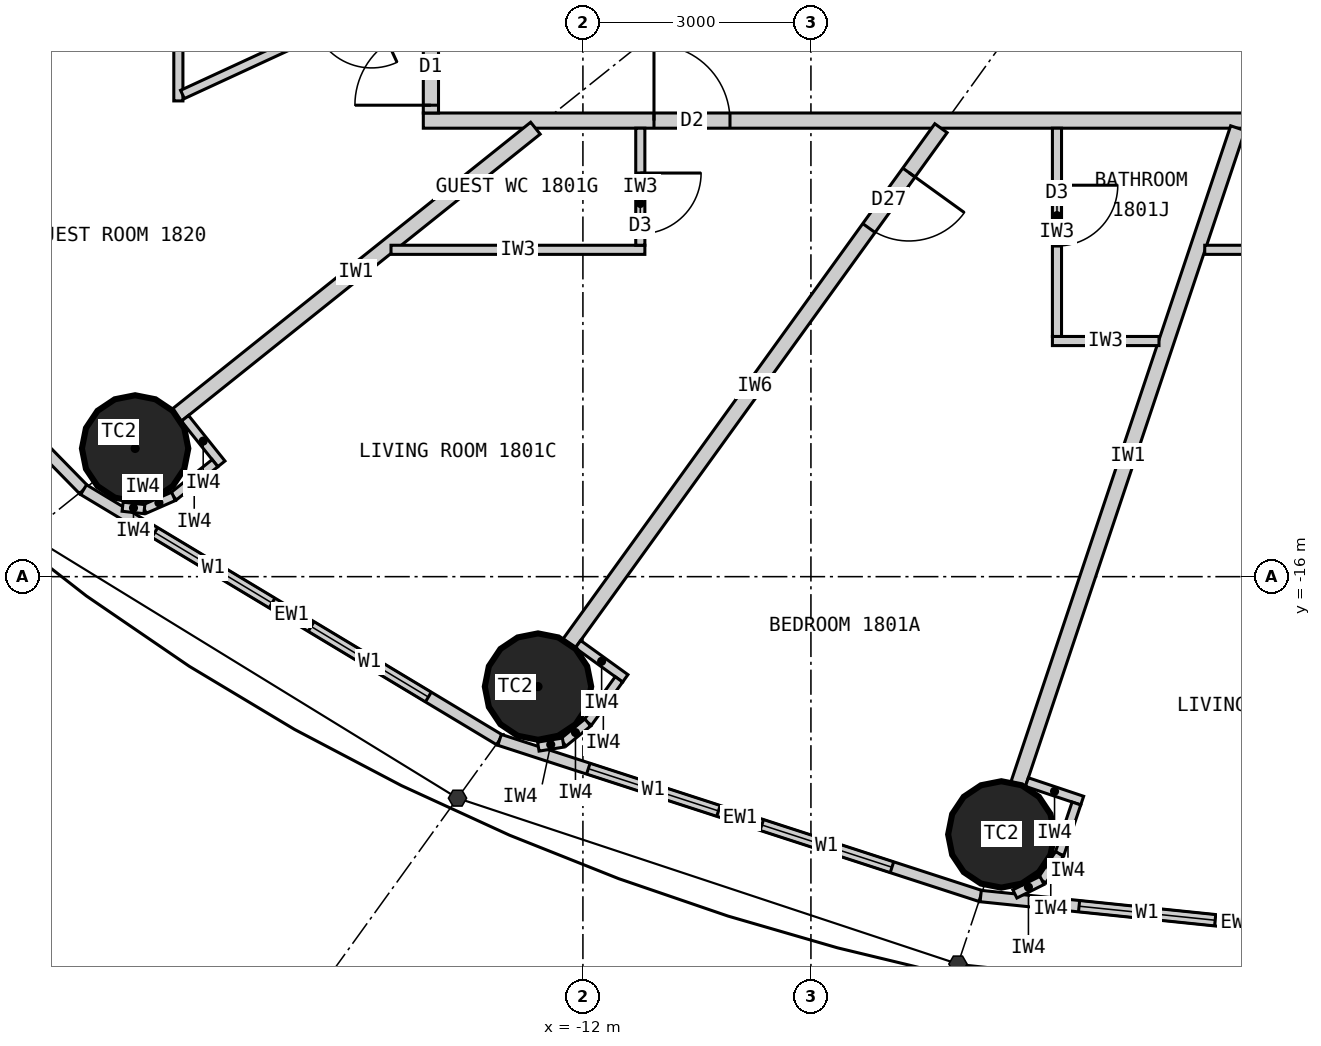
"""IFC4 building model, lengths in metres.
Left out: names, types, materials, properties, quantities, classifications, styles, units other than length and angle.
Written with IfcOpenShell. Run it as: python <this file> out.ifc"""

import sys

from ifc_helpers import new_model, si_unit, direction, frame, frame_2d, origin, origin_2d, place, context, subcontext, project, spatial, rectangle, circle, extrude, element, fill, save


model = new_model("IFC4")
c1 = context("Model", 3, precision=1e-05, world=origin(), true_north=direction((0.0, 1.0)))
c2 = subcontext(c1, "Body", "Model", "MODEL_VIEW")
j1 = project(units=[si_unit("LENGTHUNIT", "METRE"), si_unit("PLANEANGLEUNIT", "RADIAN")], contexts=[c1])
p1 = place(None, origin())
s1 = spatial("IfcSite", under=j1, at=p1, CompositionType="ELEMENT")
p2 = place(p1, origin())
s2 = spatial("IfcBuilding", under=s1, at=p2, CompositionType="ELEMENT")
p3 = place(p2, frame((0.0, 0.0, 73.8)))
s3 = spatial("IfcBuildingStorey", under=s2, at=p3, CompositionType="ELEMENT", Elevation=73.8)
for number, where, z_axis, x_axis in (
    (1, (-17.892, -14.313, 0.0), (0.0, 0.0, 1.0), (1.0, 0.0, 0.0)),
    (2, (-12.591, -17.447, 0.0), (0.0, 0.0, 1.0), (1.0, 0.0, 0.0)),
    (3, (-6.495, -19.391, 0.0), (0.0, 0.0, 1.0), (1.0, 0.0, 0.0)),
):
    element("IfcColumn", number, at=place(p3, frame(where, z_axis=z_axis, x_axis=x_axis)), inside=s3, PredefinedType="COLUMN", context=c2, shape_type="SweptSolid", body=[
        extrude(circle(Radius=0.7, at=origin_2d()), origin(), (0.0, 0.0, 1.0), 3.3),
    ])
p4 = place(p3, frame((-22.803, -10.532, 0.0), z_axis=(0.0, 0.0, 1.0), x_axis=(0.699602905915, -0.714531856557, 0.0)))
e4 = element("IfcWall", 4, at=p4, inside=s3, PredefinedType="ELEMENTEDWALL", context=c2, shape_type="SweptSolid", body=[
    extrude(rectangle(XDim=6.051, YDim=0.15, at=frame_2d((3.025, 0.0))), origin(), (0.0, 0.0, 1.0), 3.12),
])
p5 = place(p4, frame((0.926, 0.0, 0.9)))
e5 = element("IfcOpeningElement", 5, at=p5, cuts=e4, PredefinedType="OPENING", context=c2, shape_type="SweptSolid", body=[
    extrude(rectangle(XDim=1.8, YDim=1.9, at=frame_2d((0.9, 0.95))), frame((0.0, 0.085, 0.0), z_axis=(0.0, -1.0, 0.0), x_axis=(1.0, 0.0, 0.0)), (0.0, 0.0, 1.0), 0.17),
])
p6 = place(p4, frame((3.325, 0.0, 0.9)))
e6 = element("IfcOpeningElement", 6, at=p6, cuts=e4, PredefinedType="OPENING", context=c2, shape_type="SweptSolid", body=[
    extrude(rectangle(XDim=1.8, YDim=1.9, at=frame_2d((0.9, 0.95))), frame((0.0, 0.085, 0.0), z_axis=(0.0, -1.0, 0.0), x_axis=(1.0, 0.0, 0.0)), (0.0, 0.0, 1.0), 0.17),
])
p7 = place(p3, frame((-18.57, -14.856, 0.0), z_axis=(0.0, 0.0, 1.0), x_axis=(0.856983180864, -0.515344377787, 0.0)))
e7 = element("IfcWall", 7, at=p7, inside=s3, PredefinedType="ELEMENTEDWALL", context=c2, shape_type="SweptSolid", body=[
    extrude(rectangle(XDim=6.386, YDim=0.15, at=frame_2d((3.193, 0.0))), origin(), (0.0, 0.0, 1.0), 3.12),
])
p8 = place(p7, frame((1.093, 0.0, 0.9)))
e8 = element("IfcOpeningElement", 8, at=p8, cuts=e7, PredefinedType="OPENING", context=c2, shape_type="SweptSolid", body=[
    extrude(rectangle(XDim=1.8, YDim=1.9, at=frame_2d((0.9, 0.95))), frame((0.0, 0.085, 0.0), z_axis=(0.0, -1.0, 0.0), x_axis=(1.0, 0.0, 0.0)), (0.0, 0.0, 1.0), 0.17),
])
p9 = place(p7, frame((3.493, 0.0, 0.9)))
e9 = element("IfcOpeningElement", 9, at=p9, cuts=e7, PredefinedType="OPENING", context=c2, shape_type="SweptSolid", body=[
    extrude(rectangle(XDim=1.8, YDim=1.9, at=frame_2d((0.9, 0.95))), frame((0.0, 0.085, 0.0), z_axis=(0.0, -1.0, 0.0), x_axis=(1.0, 0.0, 0.0)), (0.0, 0.0, 1.0), 0.17),
])
p10 = place(p3, frame((-13.096, -18.147, 0.0), z_axis=(0.0, 0.0, 1.0), x_axis=(0.951137534625, -0.308767534285, 0.0)))
e10 = element("IfcWall", 10, at=p10, inside=s3, PredefinedType="ELEMENTEDWALL", context=c2, shape_type="SweptSolid", body=[
    extrude(rectangle(XDim=6.655, YDim=0.15, at=frame_2d((3.328, 0.0))), origin(), (0.0, 0.0, 1.0), 3.12),
])
p11 = place(p10, frame((1.228, 0.0, 0.9)))
e11 = element("IfcOpeningElement", 11, at=p11, cuts=e10, PredefinedType="OPENING", context=c2, shape_type="SweptSolid", body=[
    extrude(rectangle(XDim=1.8, YDim=1.9, at=frame_2d((0.9, 0.95))), frame((0.0, 0.085, 0.0), z_axis=(0.0, -1.0, 0.0), x_axis=(1.0, 0.0, 0.0)), (0.0, 0.0, 1.0), 0.17),
])
p12 = place(p10, frame((3.628, 0.0, 0.9)))
e12 = element("IfcOpeningElement", 12, at=p12, cuts=e10, PredefinedType="OPENING", context=c2, shape_type="SweptSolid", body=[
    extrude(rectangle(XDim=1.8, YDim=1.9, at=frame_2d((0.9, 0.95))), frame((0.0, 0.085, 0.0), z_axis=(0.0, -1.0, 0.0), x_axis=(1.0, 0.0, 0.0)), (0.0, 0.0, 1.0), 0.17),
])
p13 = place(p3, frame((-6.766, -20.202, 0.0), z_axis=(0.0, 0.0, 1.0), x_axis=(0.994721394369, -0.102612609291, 0.0)))
e13 = element("IfcWall", 13, at=p13, inside=s3, PredefinedType="ELEMENTEDWALL", context=c2, shape_type="SweptSolid", body=[
    extrude(rectangle(XDim=6.802, YDim=0.15, at=frame_2d((3.401, 0.0))), origin(), (0.0, 0.0, 1.0), 3.12),
])
p14 = place(p13, frame((1.301, 0.0, 0.9)))
e14 = element("IfcOpeningElement", 14, at=p14, cuts=e13, PredefinedType="OPENING", context=c2, shape_type="SweptSolid", body=[
    extrude(rectangle(XDim=1.8, YDim=1.9, at=frame_2d((0.9, 0.95))), frame((0.0, 0.085, 0.0), z_axis=(0.0, -1.0, 0.0), x_axis=(1.0, 0.0, 0.0)), (0.0, 0.0, 1.0), 0.17),
])
p15 = place(p13, frame((3.701, 0.0, 0.9)))
e15 = element("IfcOpeningElement", 15, at=p15, cuts=e13, PredefinedType="OPENING", context=c2, shape_type="SweptSolid", body=[
    extrude(rectangle(XDim=1.8, YDim=1.9, at=frame_2d((0.9, 0.95))), frame((0.0, 0.085, 0.0), z_axis=(0.0, -1.0, 0.0), x_axis=(1.0, 0.0, 0.0)), (0.0, 0.0, 1.0), 0.17),
])
p16 = place(p3, frame((14.1, -10.0, 0.0), z_axis=(0.0, 0.0, 1.0), x_axis=(-1.0, 0.0, 0.0)))
e16 = element("IfcWall", 16, at=p16, inside=s3, PredefinedType="PARTITIONING", context=c2, shape_type="SweptSolid", body=[
    extrude(rectangle(XDim=28.2, YDim=0.2, at=frame_2d((14.1, 0.0))), origin(), (0.0, 0.0, 1.0), 3.12),
])
p17 = place(p16, frame((24.165, 0.0, 0.0)))
e17 = element("IfcOpeningElement", 17, at=p17, cuts=e16, PredefinedType="OPENING", context=c2, shape_type="SweptSolid", body=[
    extrude(rectangle(XDim=1.0, YDim=2.2, at=frame_2d((0.5, 1.1))), frame((0.0, 0.11, 0.0), z_axis=(0.0, -1.0, 0.0), x_axis=(1.0, 0.0, 0.0)), (0.0, 0.0, 1.0), 0.22),
])
p18 = place(p16, frame((14.923, 0.0, 0.0)))
e18 = element("IfcOpeningElement", 18, at=p18, cuts=e16, PredefinedType="OPENING", context=c2, shape_type="SweptSolid", body=[
    extrude(rectangle(XDim=1.0, YDim=2.2, at=frame_2d((0.5, 1.1))), frame((0.0, 0.11, 0.0), z_axis=(0.0, -1.0, 0.0), x_axis=(1.0, 0.0, 0.0)), (0.0, 0.0, 1.0), 0.22),
])
p19 = place(p16, frame((3.035, 0.0, 0.0)))
e19 = element("IfcOpeningElement", 19, at=p19, cuts=e16, PredefinedType="OPENING", context=c2, shape_type="SweptSolid", body=[
    extrude(rectangle(XDim=1.0, YDim=2.2, at=frame_2d((0.5, 1.1))), frame((0.0, 0.11, 0.0), z_axis=(0.0, -1.0, 0.0), x_axis=(1.0, 0.0, 0.0)), (0.0, 0.0, 1.0), 0.22),
])
p20 = place(p3, frame((-14.1, -6.512, 0.0), z_axis=(0.0, 0.0, 1.0), x_axis=(-0.907832871056, -0.419332181247, 0.0)))
e20 = element("IfcWall", 20, at=p20, inside=s3, PredefinedType="PARTITIONING", context=c2, shape_type="SweptSolid", body=[
    extrude(rectangle(XDim=8.023, YDim=0.2, at=frame_2d((4.011, 0.0))), origin(), (0.0, 0.0, 1.0), 2.32),
])
p21 = place(p3, frame((-12.625, -10.1, 0.0), z_axis=(0.0, 0.0, 1.0), x_axis=(-0.780892451574, -0.624665493744, 0.0)))
e21 = element("IfcWall", 21, at=p21, inside=s3, PredefinedType="PARTITIONING", context=c2, shape_type="SweptSolid", body=[
    extrude(rectangle(XDim=6.045, YDim=0.2, at=frame_2d((3.022, 0.0))), origin(), (0.0, 0.0, 1.0), 2.32),
])
p22 = place(p3, frame((-7.289, -10.1, 0.0), z_axis=(0.0, 0.0, 1.0), x_axis=(-0.585198353053, -0.810890182197, 0.0)))
e22 = element("IfcWall", 22, at=p22, inside=s3, PredefinedType="PARTITIONING", context=c2, shape_type="SweptSolid", body=[
    extrude(rectangle(XDim=8.36, YDim=0.2, at=frame_2d((4.18, 0.0))), origin(), (0.0, 0.0, 1.0), 2.32),
])
p23 = place(p22, frame((0.72, 0.0, 0.0)))
e23 = element("IfcOpeningElement", 23, at=p23, cuts=e22, PredefinedType="OPENING", context=c2, shape_type="SweptSolid", body=[
    extrude(rectangle(XDim=0.9, YDim=2.1, at=frame_2d((0.45, 1.05))), frame((0.0, 0.11, 0.0), z_axis=(0.0, -1.0, 0.0), x_axis=(1.0, 0.0, 0.0)), (0.0, 0.0, 1.0), 0.22),
])
p24 = place(p3, frame((-3.383, -10.1, 0.0), z_axis=(0.0, 0.0, 1.0), x_axis=(-0.31759592231, -0.948226149256, 0.0)))
e24 = element("IfcWall", 24, at=p24, inside=s3, PredefinedType="PARTITIONING", context=c2, shape_type="SweptSolid", body=[
    extrude(rectangle(XDim=9.098, YDim=0.2, at=frame_2d((4.549, 0.0))), origin(), (0.0, 0.0, 1.0), 2.32),
])
p25 = place(p3, frame((-14.525, -11.7, 0.0), z_axis=(0.0, 0.0, 1.0), x_axis=(1.0, 0.0, 0.0)))
e25 = element("IfcWall", 25, at=p25, inside=s3, PredefinedType="PARTITIONING", context=c2, shape_type="SweptSolid", body=[
    extrude(rectangle(XDim=3.34, YDim=0.12, at=frame_2d((1.67, 0.0))), origin(), (0.0, 0.0, 1.0), 3.12),
])
p26 = place(p3, frame((-11.245, -10.1, 0.0), z_axis=(0.0, 0.0, 1.0), x_axis=(0.0, -1.0, 0.0)))
e26 = element("IfcWall", 26, at=p26, inside=s3, PredefinedType="PARTITIONING", context=c2, shape_type="SweptSolid", body=[
    extrude(rectangle(XDim=1.54, YDim=0.12, at=frame_2d((0.77, 0.0))), origin(), (0.0, 0.0, 1.0), 3.12),
])
p27 = place(p26, frame((0.59, 0.0, 0.0)))
e27 = element("IfcOpeningElement", 27, at=p27, cuts=e26, PredefinedType="OPENING", context=c2, shape_type="SweptSolid", body=[
    extrude(rectangle(XDim=0.8, YDim=2.1, at=frame_2d((0.4, 1.05))), frame((0.0, 0.07, 0.0), z_axis=(0.0, -1.0, 0.0), x_axis=(1.0, 0.0, 0.0)), (0.0, 0.0, 1.0), 0.14),
])
p28 = place(p3, frame((-4.421, -12.9, 0.0), z_axis=(0.0, 0.0, 1.0), x_axis=(-1.0, 0.0, 0.0)))
e28 = element("IfcWall", 28, at=p28, inside=s3, PredefinedType="PARTITIONING", context=c2, shape_type="SweptSolid", body=[
    extrude(rectangle(XDim=1.402, YDim=0.12, at=frame_2d((0.701, 0.0))), origin(), (0.0, 0.0, 1.0), 3.12),
])
p29 = place(p3, frame((-5.763, -10.1, 0.0), z_axis=(0.0, 0.0, 1.0), x_axis=(0.0, -1.0, 0.0)))
e29 = element("IfcWall", 29, at=p29, inside=s3, PredefinedType="PARTITIONING", context=c2, shape_type="SweptSolid", body=[
    extrude(rectangle(XDim=2.74, YDim=0.12, at=frame_2d((1.37, 0.0))), origin(), (0.0, 0.0, 1.0), 3.12),
])
p30 = place(p29, frame((0.75, 0.0, 0.0)))
e30 = element("IfcOpeningElement", 30, at=p30, cuts=e29, PredefinedType="OPENING", context=c2, shape_type="SweptSolid", body=[
    extrude(rectangle(XDim=0.8, YDim=2.1, at=frame_2d((0.4, 1.05))), frame((0.0, 0.07, 0.0), z_axis=(0.0, -1.0, 0.0), x_axis=(1.0, 0.0, 0.0)), (0.0, 0.0, 1.0), 0.14),
])
p31 = place(p3, frame((-3.819, -11.7, 0.0), z_axis=(0.0, 0.0, 1.0), x_axis=(1.0, 0.0, 0.0)))
e31 = element("IfcWall", 31, at=p31, inside=s3, PredefinedType="PARTITIONING", context=c2, shape_type="SweptSolid", body=[
    extrude(rectangle(XDim=1.876, YDim=0.12, at=frame_2d((0.938, 0.0))), origin(), (0.0, 0.0, 1.0), 3.12),
])
p32 = place(p3, frame((-17.323, -8.101, 0.0), z_axis=(0.0, 0.0, 1.0), x_axis=(0.0, -1.0, 0.0)))
e32 = element("IfcWall", 32, at=p32, inside=s3, PredefinedType="PARTITIONING", context=c2, shape_type="SweptSolid", body=[
    extrude(rectangle(XDim=1.64, YDim=0.12, at=frame_2d((0.82, 0.0))), origin(), (0.0, 0.0, 1.0), 3.12),
])
p33 = place(p3, frame((-14.1, -8.193, 0.0), z_axis=(0.0, 0.0, 1.0), x_axis=(-0.907836493557, -0.419324338628, 0.0)))
e33 = element("IfcWall", 33, at=p33, inside=s3, PredefinedType="PARTITIONING", context=c2, shape_type="SweptSolid", body=[
    extrude(rectangle(XDim=3.49, YDim=0.12, at=frame_2d((1.745, 0.0))), origin(), (0.0, 0.0, 1.0), 3.12),
])
p34 = place(p33, frame((0.75, 0.0, 0.0)))
e34 = element("IfcOpeningElement", 34, at=p34, cuts=e33, PredefinedType="OPENING", context=c2, shape_type="SweptSolid", body=[
    extrude(rectangle(XDim=0.8, YDim=2.1, at=frame_2d((0.4, 1.05))), frame((0.0, 0.07, 0.0), z_axis=(0.0, -1.0, 0.0), x_axis=(1.0, 0.0, 0.0)), (0.0, 0.0, 1.0), 0.14),
])
p35 = place(p3, frame((-14.0, -4.772, 0.0), z_axis=(0.0, 0.0, 1.0), x_axis=(0.0, -1.0, 0.0)))
e35 = element("IfcWall", 35, at=p35, inside=s3, PredefinedType="PARTITIONING", context=c2, shape_type="SweptSolid", body=[
    extrude(rectangle(XDim=5.127, YDim=0.2, at=frame_2d((2.564, 0.0))), origin(), (0.0, 0.0, 1.0), 3.12),
])
p36 = place(p35, frame((4.025, 0.0, 0.0)))
e36 = element("IfcOpeningElement", 36, at=p36, cuts=e35, PredefinedType="OPENING", context=c2, shape_type="SweptSolid", body=[
    extrude(rectangle(XDim=1.0, YDim=2.2, at=frame_2d((0.5, 1.1))), frame((0.0, 0.11, 0.0), z_axis=(0.0, -1.0, 0.0), x_axis=(1.0, 0.0, 0.0)), (0.0, 0.0, 1.0), 0.22),
])
p37 = place(p3, frame((-17.236, -13.917, 0.0), z_axis=(0.0, 0.0, 1.0), x_axis=(0.624695047554, -0.780868809443, 0.0)))
e37 = element("IfcWall", 37, at=p37, inside=s3, PredefinedType="PARTITIONING", context=c2, shape_type="SweptSolid", body=[
    extrude(rectangle(XDim=0.768, YDim=0.12, at=frame_2d((0.384, 0.0))), origin(), (0.0, 0.0, 1.0), 3.12),
])
p38 = place(p3, frame((-16.841, -14.507, 0.0), z_axis=(0.0, 0.0, 1.0), x_axis=(-0.780902834923, -0.62465251333, 0.0)))
e38 = element("IfcWall", 38, at=p38, inside=s3, PredefinedType="PARTITIONING", context=c2, shape_type="SweptSolid", body=[
    extrude(rectangle(XDim=0.7, YDim=0.12, at=frame_2d((0.35, 0.0))), origin(), (0.0, 0.0, 1.0), 3.12),
])
p39 = place(p3, frame((-17.387, -14.944, 0.0), z_axis=(0.0, 0.0, 1.0), x_axis=(-0.916036698064, -0.401094462441, 0.0)))
e39 = element("IfcWall", 39, at=p39, inside=s3, PredefinedType="PARTITIONING", context=c2, shape_type="SweptSolid", body=[
    extrude(rectangle(XDim=0.418, YDim=0.12, at=frame_2d((0.209, 0.0))), origin(), (0.0, 0.0, 1.0), 3.12),
])
p40 = place(p3, frame((-17.77, -15.112, 0.0), z_axis=(0.0, 0.0, 1.0), x_axis=(-0.993904401174, 0.110245368731, 0.0)))
e40 = element("IfcWall", 40, at=p40, inside=s3, PredefinedType="PARTITIONING", context=c2, shape_type="SweptSolid", body=[
    extrude(rectangle(XDim=0.288, YDim=0.12, at=frame_2d((0.144, 0.0))), origin(), (0.0, 0.0, 1.0), 3.12),
])
p41 = place(p3, frame((-12.065, -16.889, 0.0), z_axis=(0.0, 0.0, 1.0), x_axis=(0.810821798253, -0.585293098778, 0.0)))
e41 = element("IfcWall", 41, at=p41, inside=s3, PredefinedType="PARTITIONING", context=c2, shape_type="SweptSolid", body=[
    extrude(rectangle(XDim=0.768, YDim=0.12, at=frame_2d((0.384, 0.0))), origin(), (0.0, 0.0, 1.0), 3.12),
])
p42 = place(p3, frame((-11.526, -17.351, 0.0), z_axis=(0.0, 0.0, 1.0), x_axis=(-0.585223113993, -0.810872312296, 0.0)))
e42 = element("IfcWall", 42, at=p42, inside=s3, PredefinedType="PARTITIONING", context=c2, shape_type="SweptSolid", body=[
    extrude(rectangle(XDim=0.7, YDim=0.12, at=frame_2d((0.35, 0.0))), origin(), (0.0, 0.0, 1.0), 3.12),
])
p43 = place(p3, frame((-11.936, -17.919, 0.0), z_axis=(0.0, 0.0, 1.0), x_axis=(-0.775023088441, -0.631932917629, 0.0)))
e43 = element("IfcWall", 43, at=p43, inside=s3, PredefinedType="PARTITIONING", context=c2, shape_type="SweptSolid", body=[
    extrude(rectangle(XDim=0.418, YDim=0.12, at=frame_2d((0.209, 0.0))), origin(), (0.0, 0.0, 1.0), 3.12),
])
p44 = place(p3, frame((-12.26, -18.183, 0.0), z_axis=(0.0, 0.0, 1.0), x_axis=(-0.987218661664, -0.159371622511, 0.0)))
e44 = element("IfcWall", 44, at=p44, inside=s3, PredefinedType="PARTITIONING", context=c2, shape_type="SweptSolid", body=[
    extrude(rectangle(XDim=0.331, YDim=0.12, at=frame_2d((0.166, 0.0))), origin(), (0.0, 0.0, 1.0), 3.12),
])
p45 = place(p3, frame((-6.159, -18.702, 0.0), z_axis=(0.0, 0.0, 1.0), x_axis=(0.948173154049, -0.31775410295, 0.0)))
e45 = element("IfcWall", 45, at=p45, inside=s3, PredefinedType="PARTITIONING", context=c2, shape_type="SweptSolid", body=[
    extrude(rectangle(XDim=0.768, YDim=0.12, at=frame_2d((0.384, 0.0))), origin(), (0.0, 0.0, 1.0), 3.12),
])
p46 = place(p3, frame((-5.507, -18.984, 0.0), z_axis=(0.0, 0.0, 1.0), x_axis=(-0.317692050622, -0.948193946918, 0.0)))
e46 = element("IfcWall", 46, at=p46, inside=s3, PredefinedType="PARTITIONING", context=c2, shape_type="SweptSolid", body=[
    extrude(rectangle(XDim=0.7, YDim=0.12, at=frame_2d((0.35, 0.0))), origin(), (0.0, 0.0, 1.0), 3.12),
])
p47 = place(p3, frame((-5.729, -19.648, 0.0), z_axis=(0.0, 0.0, 1.0), x_axis=(-0.552135764955, -0.833754218615, 0.0)))
e47 = element("IfcWall", 47, at=p47, inside=s3, PredefinedType="PARTITIONING", context=c2, shape_type="SweptSolid", body=[
    extrude(rectangle(XDim=0.418, YDim=0.12, at=frame_2d((0.209, 0.0))), origin(), (0.0, 0.0, 1.0), 3.12),
])
p48 = place(p3, frame((-5.96, -19.996, 0.0), z_axis=(0.0, 0.0, 1.0), x_axis=(-0.895160725913, -0.445743507842, 0.0)))
e48 = element("IfcWall", 48, at=p48, inside=s3, PredefinedType="PARTITIONING", context=c2, shape_type="SweptSolid", body=[
    extrude(rectangle(XDim=0.399, YDim=0.12, at=frame_2d((0.199, 0.0))), origin(), (0.0, 0.0, 1.0), 3.12),
])
p49 = place(p8, origin())
e49 = element("IfcWindow", 49, at=p49, inside=s3, PartitioningType="SINGLE_PANEL", PredefinedType="WINDOW", context=c2, shape_type="SweptSolid", body=[
    extrude(rectangle(XDim=1.8, YDim=1.9, at=frame_2d((0.9, 0.95))), frame((0.0, 0.03, 0.0), z_axis=(0.0, -1.0, 0.0), x_axis=(1.0, 0.0, 0.0)), (0.0, 0.0, 1.0), 0.06),
])
fill(e8, e49)
p50 = place(p9, origin())
e50 = element("IfcWindow", 50, at=p50, inside=s3, PartitioningType="SINGLE_PANEL", PredefinedType="WINDOW", context=c2, shape_type="SweptSolid", body=[
    extrude(rectangle(XDim=1.8, YDim=1.9, at=frame_2d((0.9, 0.95))), frame((0.0, 0.03, 0.0), z_axis=(0.0, -1.0, 0.0), x_axis=(1.0, 0.0, 0.0)), (0.0, 0.0, 1.0), 0.06),
])
fill(e9, e50)
p51 = place(p11, origin())
e51 = element("IfcWindow", 51, at=p51, inside=s3, PartitioningType="SINGLE_PANEL", PredefinedType="WINDOW", context=c2, shape_type="SweptSolid", body=[
    extrude(rectangle(XDim=1.8, YDim=1.9, at=frame_2d((0.9, 0.95))), frame((0.0, 0.03, 0.0), z_axis=(0.0, -1.0, 0.0), x_axis=(1.0, 0.0, 0.0)), (0.0, 0.0, 1.0), 0.06),
])
fill(e11, e51)
p52 = place(p12, origin())
e52 = element("IfcWindow", 52, at=p52, inside=s3, PartitioningType="SINGLE_PANEL", PredefinedType="WINDOW", context=c2, shape_type="SweptSolid", body=[
    extrude(rectangle(XDim=1.8, YDim=1.9, at=frame_2d((0.9, 0.95))), frame((0.0, 0.03, 0.0), z_axis=(0.0, -1.0, 0.0), x_axis=(1.0, 0.0, 0.0)), (0.0, 0.0, 1.0), 0.06),
])
fill(e12, e52)
p53 = place(p14, origin())
e53 = element("IfcWindow", 53, at=p53, inside=s3, PartitioningType="SINGLE_PANEL", PredefinedType="WINDOW", context=c2, shape_type="SweptSolid", body=[
    extrude(rectangle(XDim=1.8, YDim=1.9, at=frame_2d((0.9, 0.95))), frame((0.0, 0.03, 0.0), z_axis=(0.0, -1.0, 0.0), x_axis=(1.0, 0.0, 0.0)), (0.0, 0.0, 1.0), 0.06),
])
fill(e14, e53)
p54 = place(p27, origin())
e54 = element("IfcDoor", 54, at=p54, inside=s3, OperationType="SINGLE_SWING_LEFT", PredefinedType="DOOR", context=c2, shape_type="SweptSolid", body=[
    extrude(rectangle(XDim=0.8, YDim=2.1, at=frame_2d((0.4, 1.05))), frame((0.0, 0.025, 0.0), z_axis=(0.0, -1.0, 0.0), x_axis=(1.0, 0.0, 0.0)), (0.0, 0.0, 1.0), 0.05),
])
fill(e27, e54)
p55 = place(p17, origin())
e55 = element("IfcDoor", 55, at=p55, inside=s3, OperationType="SINGLE_SWING_RIGHT", PredefinedType="DOOR", context=c2, shape_type="SweptSolid", body=[
    extrude(rectangle(XDim=1.0, YDim=2.2, at=frame_2d((0.5, 1.1))), frame((0.0, 0.025, 0.0), z_axis=(0.0, -1.0, 0.0), x_axis=(1.0, 0.0, 0.0)), (0.0, 0.0, 1.0), 0.05),
])
fill(e17, e55)
p56 = place(p30, origin())
e56 = element("IfcDoor", 56, at=p56, inside=s3, OperationType="SINGLE_SWING_LEFT", PredefinedType="DOOR", context=c2, shape_type="SweptSolid", body=[
    extrude(rectangle(XDim=0.8, YDim=2.1, at=frame_2d((0.4, 1.05))), frame((0.0, 0.025, 0.0), z_axis=(0.0, -1.0, 0.0), x_axis=(1.0, 0.0, 0.0)), (0.0, 0.0, 1.0), 0.05),
])
fill(e30, e56)
p57 = place(p23, origin())
e57 = element("IfcDoor", 57, at=p57, inside=s3, OperationType="SINGLE_SWING_LEFT", PredefinedType="DOOR", context=c2, shape_type="SweptSolid", body=[
    extrude(rectangle(XDim=0.9, YDim=2.1, at=frame_2d((0.45, 1.05))), frame((0.0, 0.025, 0.0), z_axis=(0.0, -1.0, 0.0), x_axis=(1.0, 0.0, 0.0)), (0.0, 0.0, 1.0), 0.05),
])
fill(e23, e57)
p58 = place(p36, origin())
e58 = element("IfcDoor", 58, at=p58, inside=s3, OperationType="SINGLE_SWING_RIGHT", PredefinedType="DOOR", context=c2, shape_type="SweptSolid", body=[
    extrude(rectangle(XDim=1.0, YDim=2.2, at=frame_2d((0.5, 1.1))), frame((0.0, 0.025, 0.0), z_axis=(0.0, -1.0, 0.0), x_axis=(1.0, 0.0, 0.0)), (0.0, 0.0, 1.0), 0.05),
])
fill(e36, e58)
save(model, sys.argv[1])
